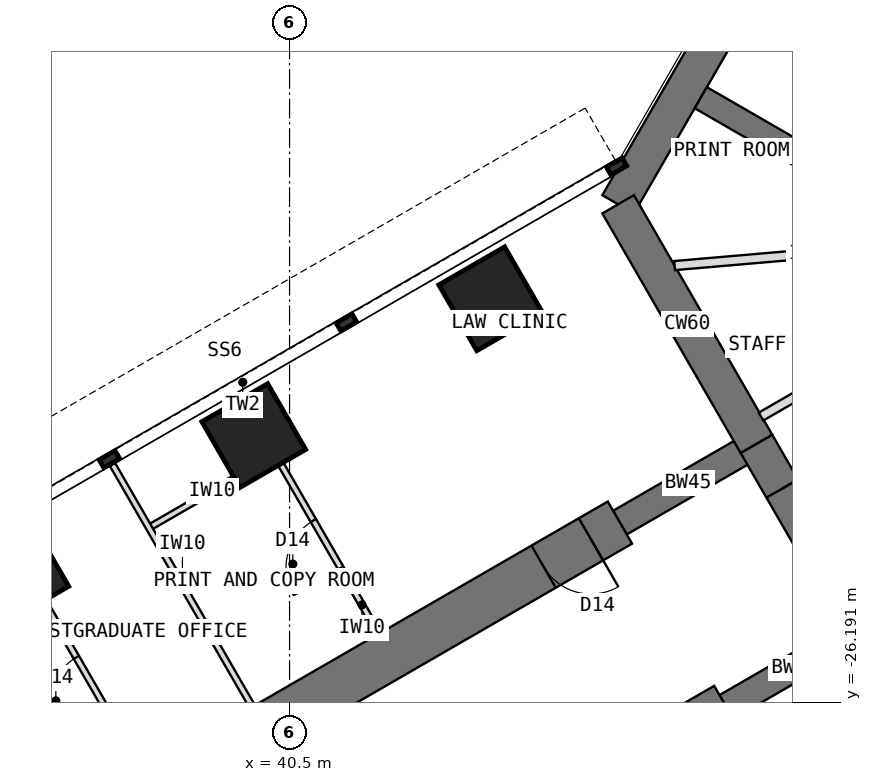
"""IFC4 building model, lengths in metres.
Left out: names, types, materials, properties, quantities, classifications, styles, units other than length and angle.
Written with IfcOpenShell. Run it as: python <this file> out.ifc"""

import sys

from ifc_helpers import new_model, si_unit, direction, frame, frame_2d, origin, origin_2d, place, context, subcontext, project, spatial, rectangle, extrude, element, fill, save


model = new_model("IFC4")
c1 = context("Model", 3, precision=1e-05, world=origin(), true_north=direction((0.0, 1.0)))
c2 = subcontext(c1, "Body", "Model", "MODEL_VIEW")
j1 = project(units=[si_unit("LENGTHUNIT", "METRE"), si_unit("PLANEANGLEUNIT", "RADIAN")], contexts=[c1])
p1 = place(None, origin())
s1 = spatial("IfcSite", under=j1, at=p1, CompositionType="ELEMENT")
p2 = place(p1, origin())
s2 = spatial("IfcBuilding", under=s1, at=p2, CompositionType="ELEMENT")
p3 = place(p2, frame((0.0, 0.0, 161.5)))
s3 = spatial("IfcBuildingStorey", under=s2, at=p3, CompositionType="ELEMENT", Elevation=161.5)
p4 = place(p3, frame((52.202, -7.092, 0.0), z_axis=(0.0, 0.0, 1.0), x_axis=(-0.500005998175, -0.866021940709, 0.0)))
e1 = element("IfcWall", 1, at=p4, inside=s3, PredefinedType="SHEAR", context=c2, shape_type="SweptSolid", body=[
    extrude(rectangle(XDim=12.596, YDim=0.6, at=frame_2d((6.298, 0.0))), origin(), (0.0, 0.0, 1.0), 4.0),
])
p5 = place(p3, frame((45.904, -18.0, 0.0), z_axis=(0.0, 0.0, 1.0), x_axis=(0.500024481964, -0.866011268655, 0.0)))
e2 = element("IfcWall", 2, at=p5, inside=s3, PredefinedType="SHEAR", context=c2, shape_type="SweptSolid", body=[
    extrude(rectangle(XDim=4.548, YDim=0.6, at=frame_2d((2.274, 0.0))), origin(), (0.0, 0.0, 1.0), 4.0),
])
p6 = place(p3, frame((48.178, -21.939, 0.0), z_axis=(0.0, 0.0, 1.0), x_axis=(0.500010275428, -0.866019471182, 0.0)))
e3 = element("IfcWall", 3, at=p6, inside=s3, PredefinedType="SHEAR", context=c2, shape_type="SweptSolid", body=[
    extrude(rectangle(XDim=3.5, YDim=0.6, at=frame_2d((1.75, 0.0))), origin(), (0.0, 0.0, 1.0), 4.0),
])
p7 = place(p6, frame((0.85, 0.0, 0.0)))
e4 = element("IfcOpeningElement", 4, at=p7, cuts=e3, PredefinedType="OPENING", context=c2, shape_type="SweptSolid", body=[
    extrude(rectangle(XDim=1.8, YDim=2.1, at=frame_2d((0.9, 1.05))), frame((0.0, 0.31, 0.0), z_axis=(0.0, -1.0, 0.0), x_axis=(1.0, 0.0, 0.0)), (0.0, 0.0, 1.0), 0.62),
])
p8 = place(p3, frame((49.928, -24.97, 0.0), z_axis=(0.0, 0.0, 1.0), x_axis=(-0.866031863473, -0.499988811324, 0.0)))
e5 = element("IfcWall", 5, at=p8, inside=s3, PredefinedType="SHEAR", context=c2, shape_type="SweptSolid", body=[
    extrude(rectangle(XDim=2.592, YDim=0.45, at=frame_2d((1.296, 0.0))), origin(), (0.0, 0.0, 1.0), 4.0),
])
p9 = place(p3, frame((47.684, -26.266, 0.0), z_axis=(0.0, 0.0, 1.0), x_axis=(-0.866027579429, -0.499996231654, 0.0)))
e6 = element("IfcWall", 6, at=p9, inside=s3, PredefinedType="SHEAR", context=c2, shape_type="SweptSolid", body=[
    extrude(rectangle(XDim=13.2, YDim=0.8, at=frame_2d((6.6, 0.0))), origin(), (0.0, 0.0, 1.0), 4.0),
])
p10 = place(p9, frame((0.55, 0.0, 0.0)))
e7 = element("IfcOpeningElement", 7, at=p10, cuts=e6, PredefinedType="OPENING", context=c2, shape_type="SweptSolid", body=[
    extrude(rectangle(XDim=0.9, YDim=2.1, at=frame_2d((0.45, 1.05))), frame((0.0, 0.41, 0.0), z_axis=(0.0, -1.0, 0.0), x_axis=(1.0, 0.0, 0.0)), (0.0, 0.0, 1.0), 0.82),
])
p11 = place(p9, frame((7.3, 0.0, 0.0)))
e8 = element("IfcOpeningElement", 8, at=p11, cuts=e6, PredefinedType="OPENING", context=c2, shape_type="SweptSolid", body=[
    extrude(rectangle(XDim=0.9, YDim=2.1, at=frame_2d((0.45, 1.05))), frame((0.0, 0.41, 0.0), z_axis=(0.0, -1.0, 0.0), x_axis=(1.0, 0.0, 0.0)), (0.0, 0.0, 1.0), 0.82),
])
p12 = place(p3, frame((48.178, -21.939, 0.0), z_axis=(0.0, 0.0, 1.0), x_axis=(-0.866072649678, -0.499918158782, 0.0)))
e9 = element("IfcWall", 9, at=p12, inside=s3, PredefinedType="SHEAR", context=c2, shape_type="SweptSolid", body=[
    extrude(rectangle(XDim=2.592, YDim=0.45, at=frame_2d((1.296, 0.0))), origin(), (0.0, 0.0, 1.0), 4.0),
])
p13 = place(p3, frame((45.934, -23.234, 0.0), z_axis=(0.0, 0.0, 1.0), x_axis=(-0.866019570528, -0.500010103361, 0.0)))
e10 = element("IfcWall", 10, at=p13, inside=s3, PredefinedType="SHEAR", context=c2, shape_type="SweptSolid", body=[
    extrude(rectangle(XDim=13.2, YDim=0.8, at=frame_2d((6.6, 0.0))), origin(), (0.0, 0.0, 1.0), 4.0),
])
p14 = place(p13, frame((0.55, 0.0, 0.0)))
e11 = element("IfcOpeningElement", 11, at=p14, cuts=e10, PredefinedType="OPENING", context=c2, shape_type="SweptSolid", body=[
    extrude(rectangle(XDim=0.9, YDim=2.1, at=frame_2d((0.45, 1.05))), frame((0.0, 0.41, 0.0), z_axis=(0.0, -1.0, 0.0), x_axis=(1.0, 0.0, 0.0)), (0.0, 0.0, 1.0), 0.82),
])
p15 = place(p13, frame((7.3, 0.0, 0.0)))
e12 = element("IfcOpeningElement", 12, at=p15, cuts=e10, PredefinedType="OPENING", context=c2, shape_type="SweptSolid", body=[
    extrude(rectangle(XDim=0.9, YDim=2.1, at=frame_2d((0.45, 1.05))), frame((0.0, 0.41, 0.0), z_axis=(0.0, -1.0, 0.0), x_axis=(1.0, 0.0, 0.0)), (0.0, 0.0, 1.0), 0.82),
])
for number, where, z_axis, x_axis in (
    (13, (43.809, -19.554, 0.0), (0.0, 0.0, 1.0), (0.866, 0.5, 0.0)),
    (14, (39.912, -21.804, 0.0), (0.0, 0.0, 1.0), (0.866, 0.5, 0.0)),
    (15, (36.014, -24.054, 0.0), (0.0, 0.0, 1.0), (0.866, 0.5, 0.0)),
):
    element("IfcColumn", number, at=place(p3, frame(where, z_axis=z_axis, x_axis=x_axis)), inside=s3, PredefinedType="COLUMN", context=c2, shape_type="SweptSolid", body=[
        extrude(rectangle(XDim=1.25, YDim=1.25, at=origin_2d()), origin(), (0.0, 0.0, 1.0), 4.0),
    ])
p16 = place(p3, frame((52.38, -19.201, 0.0), z_axis=(0.0, 0.0, 1.0), x_axis=(-0.866027317282, 0.49999668571, 0.0)))
e16 = element("IfcWall", 16, at=p16, inside=s3, PredefinedType="SHEAR", context=c2, shape_type="SweptSolid", body=[
    extrude(rectangle(XDim=5.908, YDim=0.4, at=frame_2d((2.954, 0.0))), origin(), (0.0, 0.0, 1.0), 4.0),
])
p17 = place(p3, frame((39.888, -26.263, 0.0), z_axis=(0.0, 0.0, 1.0), x_axis=(-0.500014953309, 0.866016770315, 0.0)))
e17 = element("IfcWall", 17, at=p17, inside=s3, PredefinedType="PARTITIONING", context=c2, shape_type="SweptSolid", body=[
    extrude(rectangle(XDim=4.6, YDim=0.1, at=frame_2d((2.3, 0.0))), origin(), (0.0, 0.0, 1.0), 3.7),
])
p18 = place(p3, frame((40.266, -22.119, 0.0), z_axis=(0.0, 0.0, 1.0), x_axis=(-0.866024647952, -0.500001309137, 0.0)))
e18 = element("IfcWall", 18, at=p18, inside=s3, PredefinedType="PARTITIONING", context=c2, shape_type="SweptSolid", body=[
    extrude(rectangle(XDim=2.4, YDim=0.1, at=frame_2d((1.2, 0.0))), origin(), (0.0, 0.0, 1.0), 3.7),
])
p19 = place(p3, frame((41.967, -25.063, 0.0), z_axis=(0.0, 0.0, 1.0), x_axis=(-0.500062241894, 0.865989465428, 0.0)))
e19 = element("IfcWall", 19, at=p19, inside=s3, PredefinedType="PARTITIONING", context=c2, shape_type="SweptSolid", body=[
    extrude(rectangle(XDim=3.4, YDim=0.1, at=frame_2d((1.7, 0.0))), origin(), (0.0, 0.0, 1.0), 3.7),
])
p20 = place(p19, frame((1.25, 0.0, 0.0)))
e20 = element("IfcOpeningElement", 20, at=p20, cuts=e19, PredefinedType="OPENING", context=c2, shape_type="SweptSolid", body=[
    extrude(rectangle(XDim=0.9, YDim=2.1, at=frame_2d((0.45, 1.05))), frame((0.0, 0.06, 0.0), z_axis=(0.0, -1.0, 0.0), x_axis=(1.0, 0.0, 0.0)), (0.0, 0.0, 1.0), 0.12),
])
p21 = place(p3, frame((38.069, -27.313, 0.0), z_axis=(0.0, 0.0, 1.0), x_axis=(-0.500008388397, 0.866020560687, 0.0)))
e21 = element("IfcWall", 21, at=p21, inside=s3, PredefinedType="PARTITIONING", context=c2, shape_type="SweptSolid", body=[
    extrude(rectangle(XDim=3.4, YDim=0.1, at=frame_2d((1.7, 0.0))), origin(), (0.0, 0.0, 1.0), 3.7),
])
p22 = place(p21, frame((1.25, 0.0, 0.0)))
e22 = element("IfcOpeningElement", 22, at=p22, cuts=e21, PredefinedType="OPENING", context=c2, shape_type="SweptSolid", body=[
    extrude(rectangle(XDim=0.9, YDim=2.1, at=frame_2d((0.45, 1.05))), frame((0.0, 0.06, 0.0), z_axis=(0.0, -1.0, 0.0), x_axis=(1.0, 0.0, 0.0)), (0.0, 0.0, 1.0), 0.12),
])
p23 = place(p3, frame((48.254, -21.49, 0.0), z_axis=(0.0, 0.0, 1.0), x_axis=(0.866025707867, 0.499999473313, 0.0)))
e23 = element("IfcWall", 23, at=p23, inside=s3, PredefinedType="PARTITIONING", context=c2, shape_type="SweptSolid", body=[
    extrude(rectangle(XDim=4.476, YDim=0.15, at=frame_2d((2.238, 0.0))), origin(), (0.0, 0.0, 1.0), 3.7),
])
p24 = place(p23, frame((2.633, 0.0, 0.0)))
e24 = element("IfcOpeningElement", 24, at=p24, cuts=e23, PredefinedType="OPENING", context=c2, shape_type="SweptSolid", body=[
    extrude(rectangle(XDim=1.0, YDim=2.1, at=frame_2d((0.5, 1.05))), frame((0.0, 0.085, 0.0), z_axis=(0.0, -1.0, 0.0), x_axis=(1.0, 0.0, 0.0)), (0.0, 0.0, 1.0), 0.17),
])
p25 = place(p3, frame((51.367, -18.616, 0.0), z_axis=(0.0, 0.0, 1.0), x_axis=(-0.996291540593, -0.086041653535, 0.0)))
e25 = element("IfcWall", 25, at=p25, inside=s3, PredefinedType="PARTITIONING", context=c2, shape_type="SweptSolid", body=[
    extrude(rectangle(XDim=4.551, YDim=0.15, at=frame_2d((2.276, 0.0))), origin(), (0.0, 0.0, 1.0), 3.7),
])
p26 = place(p25, frame((0.865, 0.0, 0.0)))
e26 = element("IfcOpeningElement", 26, at=p26, cuts=e25, PredefinedType="OPENING", context=c2, shape_type="SweptSolid", body=[
    extrude(rectangle(XDim=1.0, YDim=2.1, at=frame_2d((0.5, 1.05))), frame((0.0, 0.085, 0.0), z_axis=(0.0, -1.0, 0.0), x_axis=(1.0, 0.0, 0.0)), (0.0, 0.0, 1.0), 0.17),
])
p27 = place(p7, origin())
e27 = element("IfcDoor", 27, at=p27, inside=s3, OperationType="DOUBLE_DOOR_DOUBLE_SWING", PredefinedType="DOOR", context=c2, shape_type="SweptSolid", body=[
    extrude(rectangle(XDim=1.72, YDim=2.06, at=frame_2d((0.9, 1.03))), frame((0.0, 0.025, 0.0), z_axis=(0.0, -1.0, 0.0), x_axis=(1.0, 0.0, 0.0)), (0.0, 0.0, 1.0), 0.05),
    extrude(rectangle(XDim=0.04, YDim=2.1, at=frame_2d((0.02, 1.05))), frame((0.0, 0.3, 0.0), z_axis=(0.0, -1.0, 0.0), x_axis=(1.0, 0.0, 0.0)), (0.0, 0.0, 1.0), 0.6),
    extrude(rectangle(XDim=0.04, YDim=2.1, at=frame_2d((1.78, 1.05))), frame((0.0, 0.3, 0.0), z_axis=(0.0, -1.0, 0.0), x_axis=(1.0, 0.0, 0.0)), (0.0, 0.0, 1.0), 0.6),
    extrude(rectangle(XDim=1.72, YDim=0.04, at=frame_2d((0.9, 2.08))), frame((0.0, 0.3, 0.0), z_axis=(0.0, -1.0, 0.0), x_axis=(1.0, 0.0, 0.0)), (0.0, 0.0, 1.0), 0.6),
])
fill(e4, e27)
p28 = place(p20, origin())
e28 = element("IfcDoor", 28, at=p28, inside=s3, OperationType="SINGLE_SWING_LEFT", PredefinedType="DOOR", context=c2, shape_type="SweptSolid", body=[
    extrude(rectangle(XDim=0.9, YDim=2.1, at=frame_2d((0.45, 1.05))), frame((0.0, 0.025, 0.0), z_axis=(0.0, -1.0, 0.0), x_axis=(1.0, 0.0, 0.0)), (0.0, 0.0, 1.0), 0.05),
])
fill(e20, e28)
p29 = place(p22, origin())
e29 = element("IfcDoor", 29, at=p29, inside=s3, OperationType="SINGLE_SWING_LEFT", PredefinedType="DOOR", context=c2, shape_type="SweptSolid", body=[
    extrude(rectangle(XDim=0.9, YDim=2.1, at=frame_2d((0.45, 1.05))), frame((0.0, 0.025, 0.0), z_axis=(0.0, -1.0, 0.0), x_axis=(1.0, 0.0, 0.0)), (0.0, 0.0, 1.0), 0.05),
])
fill(e22, e29)
p30 = place(p14, origin())
e30 = element("IfcDoor", 30, at=p30, inside=s3, OperationType="SINGLE_SWING_LEFT", PredefinedType="DOOR", context=c2, shape_type="SweptSolid", body=[
    extrude(rectangle(XDim=0.82, YDim=2.06, at=frame_2d((0.45, 1.03))), frame((0.0, 0.025, 0.0), z_axis=(0.0, -1.0, 0.0), x_axis=(1.0, 0.0, 0.0)), (0.0, 0.0, 1.0), 0.05),
    extrude(rectangle(XDim=0.04, YDim=2.1, at=frame_2d((0.02, 1.05))), frame((0.0, 0.4, 0.0), z_axis=(0.0, -1.0, 0.0), x_axis=(1.0, 0.0, 0.0)), (0.0, 0.0, 1.0), 0.8),
    extrude(rectangle(XDim=0.04, YDim=2.1, at=frame_2d((0.88, 1.05))), frame((0.0, 0.4, 0.0), z_axis=(0.0, -1.0, 0.0), x_axis=(1.0, 0.0, 0.0)), (0.0, 0.0, 1.0), 0.8),
    extrude(rectangle(XDim=0.82, YDim=0.04, at=frame_2d((0.45, 2.08))), frame((0.0, 0.4, 0.0), z_axis=(0.0, -1.0, 0.0), x_axis=(1.0, 0.0, 0.0)), (0.0, 0.0, 1.0), 0.8),
])
fill(e11, e30)
save(model, sys.argv[1])
